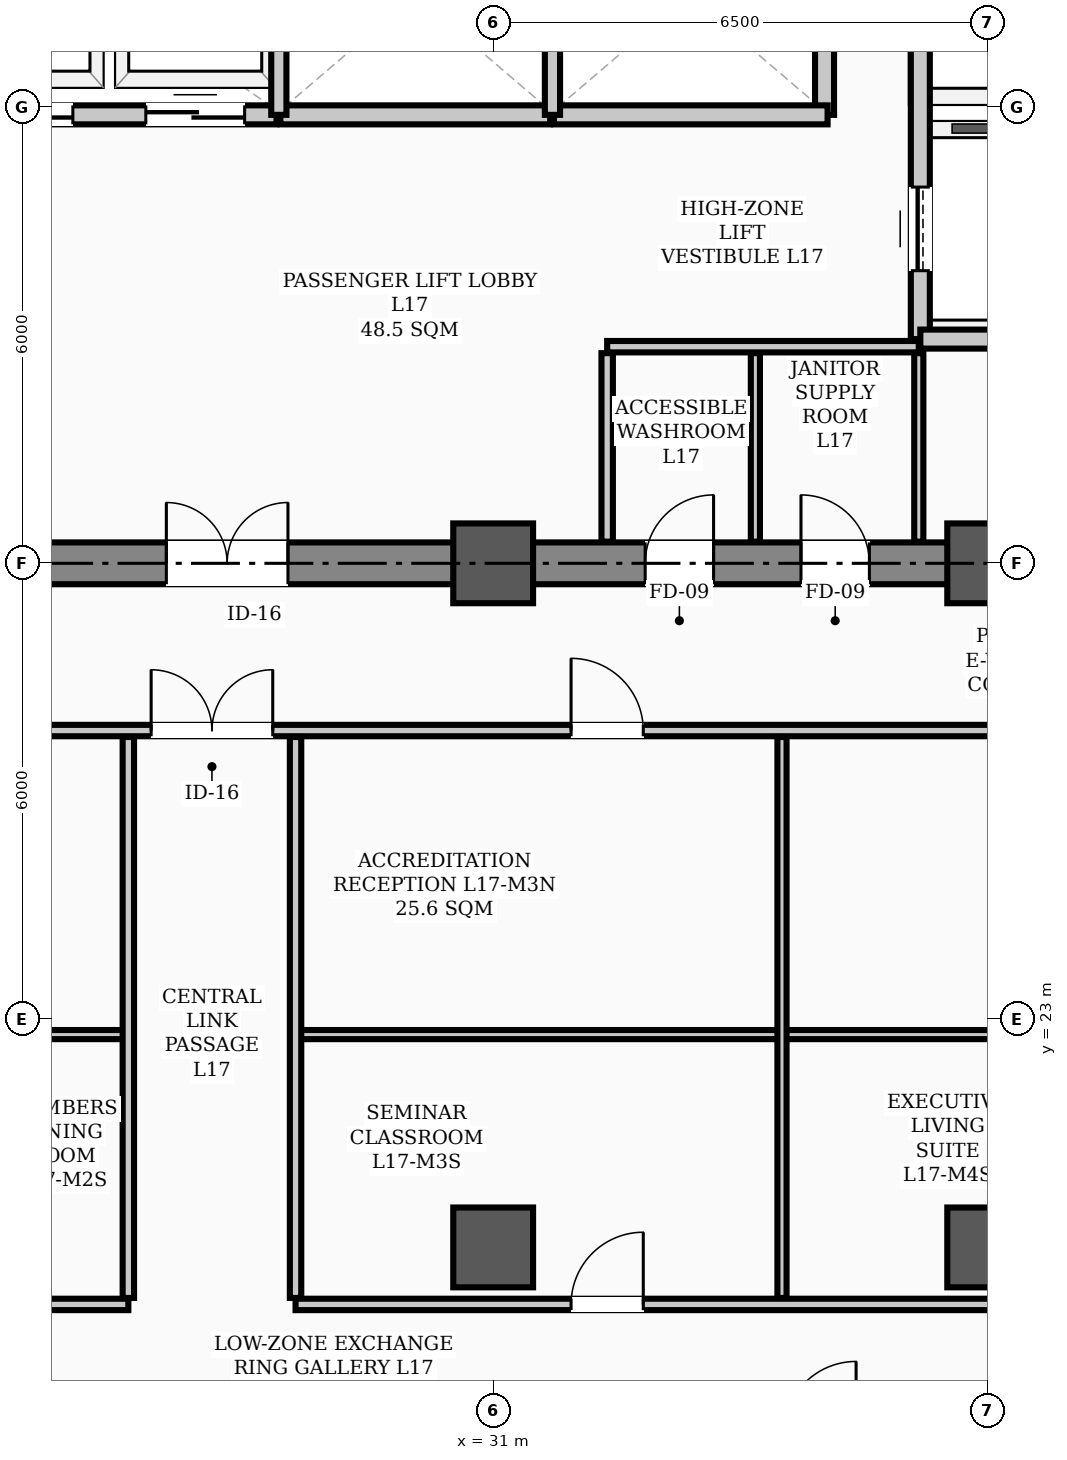
"""IFC4 building model, lengths in metres.
Left out: names, types, materials, properties, quantities, classifications, styles, units other than length and angle.
Written with IfcOpenShell. Run it as: python <this file> out.ifc"""

import sys

from ifc_helpers import new_model, si_unit, direction, frame, frame_2d, origin, origin_2d, place, context, subcontext, project, spatial, rectangle, hollow_rectangle, extrude, element, fill, save


model = new_model("IFC4")
c1 = context("Model", 3, precision=1e-05, world=origin(), true_north=direction((0.0, 1.0)))
c2 = subcontext(c1, "Body", "Model", "MODEL_VIEW")
j1 = project(units=[si_unit("LENGTHUNIT", "METRE"), si_unit("PLANEANGLEUNIT", "RADIAN")], contexts=[c1])
p1 = place(None, origin())
s1 = spatial("IfcSite", under=j1, at=p1, CompositionType="ELEMENT")
p2 = place(p1, origin())
s2 = spatial("IfcBuilding", under=s1, at=p2, CompositionType="ELEMENT")
p3 = place(p2, frame((0.0, 0.0, 69.4)))
s3 = spatial("IfcBuildingStorey", under=s2, at=p3, CompositionType="ELEMENT", Elevation=69.4)
for number, where, z_axis, x_axis in (
    (1, (31.0, 29.0, 0.0), (0.0, 0.0, 1.0), (1.0, 0.0, 0.0)),
    (2, (37.5, 29.0, 0.0), (0.0, 0.0, 1.0), (1.0, 0.0, 0.0)),
    (3, (31.0, 20.0, 0.0), (0.0, 0.0, 1.0), (1.0, 0.0, 0.0)),
    (4, (37.5, 20.0, 0.0), (0.0, 0.0, 1.0), (1.0, 0.0, 0.0)),
):
    element("IfcColumn", number, at=place(p3, frame(where, z_axis=z_axis, x_axis=x_axis)), inside=s3, PredefinedType="COLUMN", context=c2, shape_type="SweptSolid", body=[
        extrude(hollow_rectangle(XDim=1.05, YDim=1.05, WallThickness=0.038, InnerFilletRadius=0.019, OuterFilletRadius=0.057, at=origin_2d()), origin(), (0.0, 0.0, 1.0), 3.9),
    ])
p4 = place(p3, frame((13.5, 29.0, 0.0), z_axis=(0.0, 0.0, 1.0), x_axis=(1.0, 0.0, 0.0)))
e5 = element("IfcWall", 5, at=p4, inside=s3, PredefinedType="SHEAR", context=c2, shape_type="SweptSolid", body=[
    extrude(rectangle(XDim=30.5, YDim=0.55, at=frame_2d((15.25, 0.0))), origin(), (0.0, 0.0, 1.0), 3.72),
])
p5 = place(p4, frame((1.75, 0.0, 0.0)))
e6 = element("IfcOpeningElement", 6, at=p5, cuts=e5, PredefinedType="OPENING", context=c2, shape_type="SweptSolid", body=[
    extrude(rectangle(XDim=1.1, YDim=2.08, at=frame_2d((0.55, 1.04))), frame((0.0, 0.285, 0.0), z_axis=(0.0, -1.0, 0.0), x_axis=(1.0, 0.0, 0.0)), (0.0, 0.0, 1.0), 0.57),
])
p6 = place(p4, frame((26.7, 0.0, 0.0)))
e7 = element("IfcOpeningElement", 7, at=p6, cuts=e5, PredefinedType="OPENING", context=c2, shape_type="SweptSolid", body=[
    extrude(rectangle(XDim=1.1, YDim=2.08, at=frame_2d((0.55, 1.04))), frame((0.0, 0.285, 0.0), z_axis=(0.0, -1.0, 0.0), x_axis=(1.0, 0.0, 0.0)), (0.0, 0.0, 1.0), 0.57),
])
p7 = place(p4, frame((6.8, 0.0, 0.0)))
e8 = element("IfcOpeningElement", 8, at=p7, cuts=e5, PredefinedType="OPENING", context=c2, shape_type="SweptSolid", body=[
    extrude(rectangle(XDim=1.1, YDim=2.08, at=frame_2d((0.55, 1.04))), frame((0.0, 0.285, 0.0), z_axis=(0.0, -1.0, 0.0), x_axis=(1.0, 0.0, 0.0)), (0.0, 0.0, 1.0), 0.57),
])
p8 = place(p4, frame((13.2, 0.0, 0.0)))
e9 = element("IfcOpeningElement", 9, at=p8, cuts=e5, PredefinedType="OPENING", context=c2, shape_type="SweptSolid", body=[
    extrude(rectangle(XDim=1.6, YDim=2.08, at=frame_2d((0.8, 1.04))), frame((0.0, 0.285, 0.0), z_axis=(0.0, -1.0, 0.0), x_axis=(1.0, 0.0, 0.0)), (0.0, 0.0, 1.0), 0.57),
])
p9 = place(p4, frame((19.5, 0.0, 0.0)))
e10 = element("IfcOpeningElement", 10, at=p9, cuts=e5, PredefinedType="OPENING", context=c2, shape_type="SweptSolid", body=[
    extrude(rectangle(XDim=0.9, YDim=2.08, at=frame_2d((0.45, 1.04))), frame((0.0, 0.285, 0.0), z_axis=(0.0, -1.0, 0.0), x_axis=(1.0, 0.0, 0.0)), (0.0, 0.0, 1.0), 0.57),
])
p10 = place(p4, frame((21.55, 0.0, 0.0)))
e11 = element("IfcOpeningElement", 11, at=p10, cuts=e5, PredefinedType="OPENING", context=c2, shape_type="SweptSolid", body=[
    extrude(rectangle(XDim=0.9, YDim=2.08, at=frame_2d((0.45, 1.04))), frame((0.0, 0.285, 0.0), z_axis=(0.0, -1.0, 0.0), x_axis=(1.0, 0.0, 0.0)), (0.0, 0.0, 1.0), 0.57),
])
p11 = place(p3, frame((36.62, 31.95, 0.0), z_axis=(0.0, 0.0, 1.0), x_axis=(0.0, 1.0, 0.0)))
e12 = element("IfcWall", 12, at=p11, inside=s3, PredefinedType="STANDARD", context=c2, shape_type="SweptSolid", body=[
    extrude(rectangle(XDim=6.0, YDim=0.25, at=frame_2d((3.0, 0.0))), origin(), (0.0, 0.0, 1.0), 3.3),
])
p12 = place(p11, frame((0.9, 0.0, 0.0)))
e13 = element("IfcOpeningElement", 13, at=p12, cuts=e12, PredefinedType="OPENING", context=c2, shape_type="SweptSolid", body=[
    extrude(rectangle(XDim=1.1, YDim=2.08, at=frame_2d((0.55, 1.04))), frame((0.0, 0.135, 0.0), z_axis=(0.0, -1.0, 0.0), x_axis=(1.0, 0.0, 0.0)), (0.0, 0.0, 1.0), 0.27),
])
p13 = place(p11, frame((4.0, 0.0, 0.0)))
e14 = element("IfcOpeningElement", 14, at=p13, cuts=e12, PredefinedType="OPENING", context=c2, shape_type="SweptSolid", body=[
    extrude(rectangle(XDim=1.1, YDim=2.08, at=frame_2d((0.55, 1.04))), frame((0.0, 0.135, 0.0), z_axis=(0.0, -1.0, 0.0), x_axis=(1.0, 0.0, 0.0)), (0.0, 0.0, 1.0), 0.27),
])
p14 = place(p3, frame((36.62, 31.95, 0.0), z_axis=(0.0, 0.0, 1.0), x_axis=(1.0, 0.0, 0.0)))
e15 = element("IfcWall", 15, at=p14, inside=s3, PredefinedType="STANDARD", context=c2, shape_type="SweptSolid", body=[
    extrude(rectangle(XDim=1.9, YDim=0.25, at=frame_2d((0.95, 0.0))), origin(), (0.0, 0.0, 1.0), 3.48),
])
p15 = place(p3, frame((35.36, 34.9, 0.0), z_axis=(0.0, 0.0, 1.0), x_axis=(0.0, 1.0, 0.0)))
e16 = element("IfcWall", 16, at=p15, inside=s3, PredefinedType="STANDARD", context=c2, shape_type="SweptSolid", body=[
    extrude(rectangle(XDim=3.05, YDim=0.25, at=frame_2d((1.525, 0.0))), origin(), (0.0, 0.0, 1.0), 3.3),
])
p16 = place(p3, frame((23.75, 34.9, 0.0), z_axis=(0.0, 0.0, 1.0), x_axis=(1.0, 0.0, 0.0)))
e17 = element("IfcWall", 17, at=p16, inside=s3, PredefinedType="STANDARD", context=c2, shape_type="SweptSolid", body=[
    extrude(rectangle(XDim=4.4, YDim=0.25, at=frame_2d((2.2, 0.0))), origin(), (0.0, 0.0, 1.0), 3.72),
])
p17 = place(p16, frame((0.42, 0.0, 0.0)))
e18 = element("IfcOpeningElement", 18, at=p17, cuts=e17, PredefinedType="OPENING", context=c2, shape_type="SweptSolid", body=[
    extrude(rectangle(XDim=1.3, YDim=2.08, at=frame_2d((0.65, 1.04))), frame((0.0, 0.135, 0.0), z_axis=(0.0, -1.0, 0.0), x_axis=(1.0, 0.0, 0.0)), (0.0, 0.0, 1.0), 0.27),
])
p18 = place(p16, frame((2.68, 0.0, 0.0)))
e19 = element("IfcOpeningElement", 19, at=p18, cuts=e17, PredefinedType="OPENING", context=c2, shape_type="SweptSolid", body=[
    extrude(rectangle(XDim=1.3, YDim=2.08, at=frame_2d((0.65, 1.04))), frame((0.0, 0.135, 0.0), z_axis=(0.0, -1.0, 0.0), x_axis=(1.0, 0.0, 0.0)), (0.0, 0.0, 1.0), 0.27),
])
p19 = place(p3, frame((28.2, 34.9, 0.0), z_axis=(0.0, 0.0, 1.0), x_axis=(1.0, 0.0, 0.0)))
e20 = element("IfcWall", 20, at=p19, inside=s3, PredefinedType="STANDARD", context=c2, shape_type="SweptSolid", body=[
    extrude(rectangle(XDim=3.55, YDim=0.25, at=frame_2d((1.775, 0.0))), origin(), (0.0, 0.0, 1.0), 3.72),
])
p20 = place(p3, frame((31.8, 34.9, 0.0), z_axis=(0.0, 0.0, 1.0), x_axis=(1.0, 0.0, 0.0)))
e21 = element("IfcWall", 21, at=p20, inside=s3, PredefinedType="STANDARD", context=c2, shape_type="SweptSolid", body=[
    extrude(rectangle(XDim=3.6, YDim=0.25, at=frame_2d((1.8, 0.0))), origin(), (0.0, 0.0, 1.0), 3.72),
])
p21 = place(p3, frame((32.5, 31.85, 0.0), z_axis=(0.0, 0.0, 1.0), x_axis=(1.0, 0.0, 0.0)))
e22 = element("IfcWall", 22, at=p21, inside=s3, PredefinedType="PARTITIONING", context=c2, shape_type="SweptSolid", body=[
    extrude(rectangle(XDim=4.1, YDim=0.15, at=frame_2d((2.05, 0.0))), origin(), (0.0, 0.0, 1.0), 3.72),
])
p22 = place(p3, frame((12.9, 26.8, 0.0), z_axis=(0.0, 0.0, 1.0), x_axis=(1.0, 0.0, 0.0)))
e23 = element("IfcWall", 23, at=p22, inside=s3, PredefinedType="PARTITIONING", context=c2, shape_type="SweptSolid", body=[
    extrude(rectangle(XDim=31.7, YDim=0.15, at=frame_2d((15.85, 0.0))), origin(), (0.0, 0.0, 1.0), 3.1),
])
p23 = place(p22, frame((13.6, 0.0, 0.0)))
e24 = element("IfcOpeningElement", 24, at=p23, cuts=e23, PredefinedType="OPENING", context=c2, shape_type="SweptSolid", body=[
    extrude(rectangle(XDim=1.6, YDim=2.08, at=frame_2d((0.8, 1.04))), frame((0.0, 0.085, 0.0), z_axis=(0.0, -1.0, 0.0), x_axis=(1.0, 0.0, 0.0)), (0.0, 0.0, 1.0), 0.17),
])
p24 = place(p22, frame((2.475, 0.0, 0.0)))
e25 = element("IfcOpeningElement", 25, at=p24, cuts=e23, PredefinedType="OPENING", context=c2, shape_type="SweptSolid", body=[
    extrude(rectangle(XDim=0.95, YDim=2.08, at=frame_2d((0.475, 1.04))), frame((0.0, 0.085, 0.0), z_axis=(0.0, -1.0, 0.0), x_axis=(1.0, 0.0, 0.0)), (0.0, 0.0, 1.0), 0.17),
])
p25 = place(p22, frame((9.125, 0.0, 0.0)))
e26 = element("IfcOpeningElement", 26, at=p25, cuts=e23, PredefinedType="OPENING", context=c2, shape_type="SweptSolid", body=[
    extrude(rectangle(XDim=0.95, YDim=2.08, at=frame_2d((0.475, 1.04))), frame((0.0, 0.085, 0.0), z_axis=(0.0, -1.0, 0.0), x_axis=(1.0, 0.0, 0.0)), (0.0, 0.0, 1.0), 0.17),
])
p26 = place(p22, frame((19.125, 0.0, 0.0)))
e27 = element("IfcOpeningElement", 27, at=p26, cuts=e23, PredefinedType="OPENING", context=c2, shape_type="SweptSolid", body=[
    extrude(rectangle(XDim=0.95, YDim=2.08, at=frame_2d((0.475, 1.04))), frame((0.0, 0.085, 0.0), z_axis=(0.0, -1.0, 0.0), x_axis=(1.0, 0.0, 0.0)), (0.0, 0.0, 1.0), 0.17),
])
p27 = place(p22, frame((26.325, 0.0, 0.0)))
e28 = element("IfcOpeningElement", 28, at=p27, cuts=e23, PredefinedType="OPENING", context=c2, shape_type="SweptSolid", body=[
    extrude(rectangle(XDim=0.95, YDim=2.08, at=frame_2d((0.475, 1.04))), frame((0.0, 0.085, 0.0), z_axis=(0.0, -1.0, 0.0), x_axis=(1.0, 0.0, 0.0)), (0.0, 0.0, 1.0), 0.17),
])
p28 = place(p3, frame((12.9, 19.25, 0.0), z_axis=(0.0, 0.0, 1.0), x_axis=(1.0, 0.0, 0.0)))
e29 = element("IfcWall", 29, at=p28, inside=s3, PredefinedType="PARTITIONING", context=c2, shape_type="SweptSolid", body=[
    extrude(rectangle(XDim=13.3, YDim=0.15, at=frame_2d((6.65, 0.0))), origin(), (0.0, 0.0, 1.0), 3.1),
])
p29 = place(p28, frame((2.475, 0.0, 0.0)))
e30 = element("IfcOpeningElement", 30, at=p29, cuts=e29, PredefinedType="OPENING", context=c2, shape_type="SweptSolid", body=[
    extrude(rectangle(XDim=0.95, YDim=2.08, at=frame_2d((0.475, 1.04))), frame((0.0, 0.085, 0.0), z_axis=(0.0, -1.0, 0.0), x_axis=(1.0, 0.0, 0.0)), (0.0, 0.0, 1.0), 0.17),
])
p30 = place(p28, frame((9.125, 0.0, 0.0)))
e31 = element("IfcOpeningElement", 31, at=p30, cuts=e29, PredefinedType="OPENING", context=c2, shape_type="SweptSolid", body=[
    extrude(rectangle(XDim=0.95, YDim=2.08, at=frame_2d((0.475, 1.04))), frame((0.0, 0.085, 0.0), z_axis=(0.0, -1.0, 0.0), x_axis=(1.0, 0.0, 0.0)), (0.0, 0.0, 1.0), 0.17),
])
p31 = place(p3, frame((28.4, 19.25, 0.0), z_axis=(0.0, 0.0, 1.0), x_axis=(1.0, 0.0, 0.0)))
e32 = element("IfcWall", 32, at=p31, inside=s3, PredefinedType="PARTITIONING", context=c2, shape_type="SweptSolid", body=[
    extrude(rectangle(XDim=16.2, YDim=0.15, at=frame_2d((8.1, 0.0))), origin(), (0.0, 0.0, 1.0), 3.1),
])
p32 = place(p31, frame((3.625, 0.0, 0.0)))
e33 = element("IfcOpeningElement", 33, at=p32, cuts=e32, PredefinedType="OPENING", context=c2, shape_type="SweptSolid", body=[
    extrude(rectangle(XDim=0.95, YDim=2.08, at=frame_2d((0.475, 1.04))), frame((0.0, 0.085, 0.0), z_axis=(0.0, -1.0, 0.0), x_axis=(1.0, 0.0, 0.0)), (0.0, 0.0, 1.0), 0.17),
])
p33 = place(p31, frame((10.825, 0.0, 0.0)))
e34 = element("IfcOpeningElement", 34, at=p33, cuts=e32, PredefinedType="OPENING", context=c2, shape_type="SweptSolid", body=[
    extrude(rectangle(XDim=0.95, YDim=2.08, at=frame_2d((0.475, 1.04))), frame((0.0, 0.085, 0.0), z_axis=(0.0, -1.0, 0.0), x_axis=(1.0, 0.0, 0.0)), (0.0, 0.0, 1.0), 0.17),
])
p34 = place(p3, frame((18.8, 22.8, 0.0), z_axis=(0.0, 0.0, 1.0), x_axis=(1.0, 0.0, 0.0)))
e35 = element("IfcWall", 35, at=p34, inside=s3, PredefinedType="PARTITIONING", context=c2, shape_type="SweptSolid", body=[
    extrude(rectangle(XDim=7.4, YDim=0.12, at=frame_2d((3.7, 0.0))), origin(), (0.0, 0.0, 1.0), 3.1),
])
p35 = place(p3, frame((28.4, 22.8, 0.0), z_axis=(0.0, 0.0, 1.0), x_axis=(1.0, 0.0, 0.0)))
e36 = element("IfcWall", 36, at=p35, inside=s3, PredefinedType="PARTITIONING", context=c2, shape_type="SweptSolid", body=[
    extrude(rectangle(XDim=6.4, YDim=0.12, at=frame_2d((3.2, 0.0))), origin(), (0.0, 0.0, 1.0), 3.1),
])
p36 = place(p3, frame((34.8, 22.8, 0.0), z_axis=(0.0, 0.0, 1.0), x_axis=(1.0, 0.0, 0.0)))
e37 = element("IfcWall", 37, at=p36, inside=s3, PredefinedType="PARTITIONING", context=c2, shape_type="SweptSolid", body=[
    extrude(rectangle(XDim=9.8, YDim=0.12, at=frame_2d((4.9, 0.0))), origin(), (0.0, 0.0, 1.0), 3.1),
])
p37 = place(p3, frame((32.5, 29.285, 0.0), z_axis=(0.0, 0.0, 1.0), x_axis=(0.0, 1.0, 0.0)))
e38 = element("IfcWall", 38, at=p37, inside=s3, PredefinedType="PARTITIONING", context=c2, shape_type="SweptSolid", body=[
    extrude(rectangle(XDim=2.48, YDim=0.15, at=frame_2d((1.24, 0.0))), origin(), (0.0, 0.0, 1.0), 3.3),
])
for number, where, z_axis, x_axis in (
    (39, (36.6, 29.285, 0.0), (0.0, 0.0, 1.0), (0.0, 1.0, 0.0)),
    (40, (34.45, 29.285, 0.0), (0.0, 0.0, 1.0), (0.0, 1.0, 0.0)),
):
    element("IfcWall", number, at=place(p3, frame(where, z_axis=z_axis, x_axis=x_axis)), inside=s3, PredefinedType="PARTITIONING", context=c2, shape_type="SweptSolid", body=[
        extrude(rectangle(XDim=2.48, YDim=0.12, at=frame_2d((1.24, 0.0))), origin(), (0.0, 0.0, 1.0), 3.3),
    ])
for number, where, z_axis, x_axis in (
    (41, (26.2, 19.335, 0.0), (0.0, 0.0, 1.0), (0.0, 1.0, 0.0)),
    (42, (28.4, 19.335, 0.0), (0.0, 0.0, 1.0), (0.0, 1.0, 0.0)),
):
    element("IfcWall", number, at=place(p3, frame(where, z_axis=z_axis, x_axis=x_axis)), inside=s3, PredefinedType="PARTITIONING", context=c2, shape_type="SweptSolid", body=[
        extrude(rectangle(XDim=7.38, YDim=0.15, at=frame_2d((3.69, 0.0))), origin(), (0.0, 0.0, 1.0), 3.0),
    ])
p38 = place(p3, frame((34.8, 19.335, 0.0), z_axis=(0.0, 0.0, 1.0), x_axis=(0.0, 1.0, 0.0)))
e43 = element("IfcWall", 43, at=p38, inside=s3, PredefinedType="PARTITIONING", context=c2, shape_type="SweptSolid", body=[
    extrude(rectangle(XDim=7.38, YDim=0.12, at=frame_2d((3.69, 0.0))), origin(), (0.0, 0.0, 1.0), 3.0),
])
for number, where, z_axis, x_axis in (
    (44, (28.18, 34.9, 0.0), (0.0, 0.0, 1.0), (0.0, 1.0, 0.0)),
    (45, (31.78, 34.9, 0.0), (0.0, 0.0, 1.0), (0.0, 1.0, 0.0)),
):
    element("IfcWall", number, at=place(p3, frame(where, z_axis=z_axis, x_axis=x_axis)), inside=s3, PredefinedType="STANDARD", context=c2, shape_type="SweptSolid", body=[
        extrude(rectangle(XDim=3.12, YDim=0.2, at=frame_2d((1.56, 0.0))), origin(), (0.0, 0.0, 1.0), 3.3),
    ])
p39 = place(p8, origin())
e46 = element("IfcDoor", 46, at=p39, inside=s3, OperationType="DOUBLE_DOOR_SINGLE_SWING", PredefinedType="DOOR", context=c2, shape_type="SweptSolid", body=[
    extrude(rectangle(XDim=1.6, YDim=2.08, at=frame_2d((0.8, 1.04))), frame((0.0, 0.025, 0.0), z_axis=(0.0, -1.0, 0.0), x_axis=(1.0, 0.0, 0.0)), (0.0, 0.0, 1.0), 0.05),
])
fill(e9, e46)
p40 = place(p9, origin())
e47 = element("IfcDoor", 47, at=p40, inside=s3, OperationType="SINGLE_SWING_RIGHT", PredefinedType="DOOR", context=c2, shape_type="SweptSolid", body=[
    extrude(rectangle(XDim=0.9, YDim=2.08, at=frame_2d((0.45, 1.04))), frame((0.0, 0.025, 0.0), z_axis=(0.0, -1.0, 0.0), x_axis=(1.0, 0.0, 0.0)), (0.0, 0.0, 1.0), 0.05),
])
fill(e10, e47)
p41 = place(p10, origin())
e48 = element("IfcDoor", 48, at=p41, inside=s3, OperationType="SINGLE_SWING_LEFT", PredefinedType="DOOR", context=c2, shape_type="SweptSolid", body=[
    extrude(rectangle(XDim=0.9, YDim=2.08, at=frame_2d((0.45, 1.04))), frame((0.0, 0.025, 0.0), z_axis=(0.0, -1.0, 0.0), x_axis=(1.0, 0.0, 0.0)), (0.0, 0.0, 1.0), 0.05),
])
fill(e11, e48)
p42 = place(p23, origin())
e49 = element("IfcDoor", 49, at=p42, inside=s3, OperationType="DOUBLE_DOOR_SINGLE_SWING", PredefinedType="DOOR", context=c2, shape_type="SweptSolid", body=[
    extrude(rectangle(XDim=1.6, YDim=2.08, at=frame_2d((0.8, 1.04))), frame((0.0, 0.025, 0.0), z_axis=(0.0, -1.0, 0.0), x_axis=(1.0, 0.0, 0.0)), (0.0, 0.0, 1.0), 0.05),
])
fill(e24, e49)
p43 = place(p26, origin())
e50 = element("IfcDoor", 50, at=p43, inside=s3, OperationType="SINGLE_SWING_LEFT", PredefinedType="DOOR", context=c2, shape_type="SweptSolid", body=[
    extrude(rectangle(XDim=0.95, YDim=2.08, at=frame_2d((0.475, 1.04))), frame((0.0, 0.025, 0.0), z_axis=(0.0, -1.0, 0.0), x_axis=(1.0, 0.0, 0.0)), (0.0, 0.0, 1.0), 0.05),
])
fill(e27, e50)
p44 = place(p32, origin())
e51 = element("IfcDoor", 51, at=p44, inside=s3, OperationType="SINGLE_SWING_RIGHT", PredefinedType="DOOR", context=c2, shape_type="SweptSolid", body=[
    extrude(rectangle(XDim=0.95, YDim=2.08, at=frame_2d((0.475, 1.04))), frame((0.0, 0.025, 0.0), z_axis=(0.0, -1.0, 0.0), x_axis=(1.0, 0.0, 0.0)), (0.0, 0.0, 1.0), 0.05),
])
fill(e33, e51)
p45 = place(p12, origin())
e52 = element("IfcDoor", 52, at=p45, inside=s3, OperationType="SLIDING_TO_LEFT", PredefinedType="DOOR", context=c2, shape_type="SweptSolid", body=[
    extrude(rectangle(XDim=1.1, YDim=2.08, at=frame_2d((0.55, 1.04))), frame((0.0, 0.025, 0.0), z_axis=(0.0, -1.0, 0.0), x_axis=(1.0, 0.0, 0.0)), (0.0, 0.0, 1.0), 0.05),
])
fill(e13, e52)
p46 = place(p17, origin())
e53 = element("IfcDoor", 53, at=p46, inside=s3, OperationType="DOUBLE_DOOR_SLIDING", PredefinedType="DOOR", context=c2, shape_type="SweptSolid", body=[
    extrude(rectangle(XDim=1.3, YDim=2.08, at=frame_2d((0.65, 1.04))), frame((0.0, 0.025, 0.0), z_axis=(0.0, -1.0, 0.0), x_axis=(1.0, 0.0, 0.0)), (0.0, 0.0, 1.0), 0.05),
])
fill(e18, e53)
p47 = place(p18, origin())
e54 = element("IfcDoor", 54, at=p47, inside=s3, OperationType="DOUBLE_DOOR_SLIDING", PredefinedType="DOOR", context=c2, shape_type="SweptSolid", body=[
    extrude(rectangle(XDim=1.3, YDim=2.08, at=frame_2d((0.65, 1.04))), frame((0.0, 0.025, 0.0), z_axis=(0.0, -1.0, 0.0), x_axis=(1.0, 0.0, 0.0)), (0.0, 0.0, 1.0), 0.05),
])
fill(e19, e54)
save(model, sys.argv[1])
